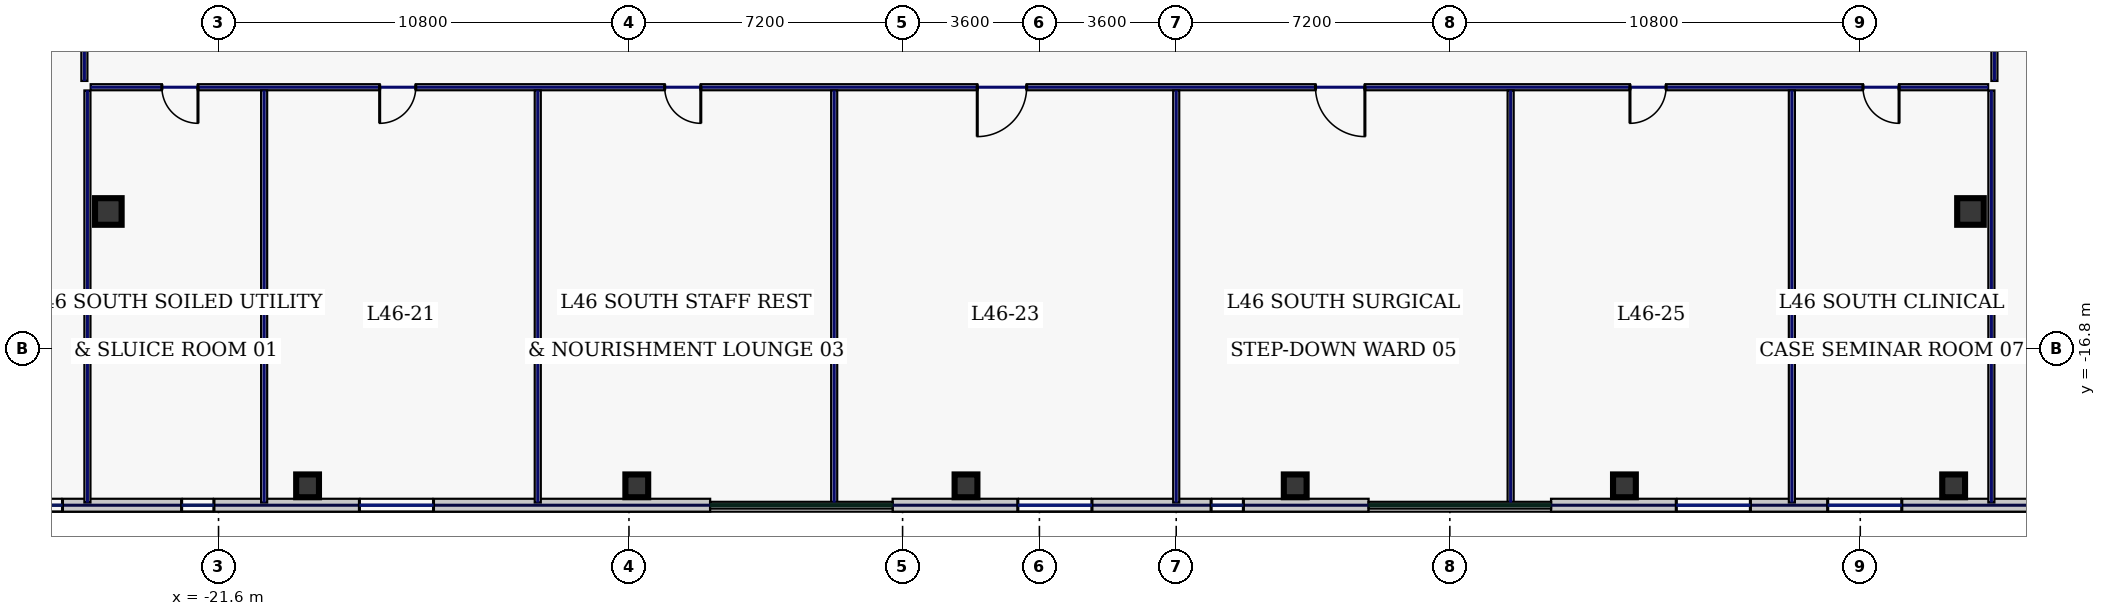
"""IFC4 building model, lengths in metres.
Left out: names, types, materials, properties, quantities, classifications, styles, units other than length and angle.
Written with IfcOpenShell. Run it as: python <this file> out.ifc"""

import sys

from ifc_helpers import new_model, si_unit, direction, frame, frame_2d, origin, origin_2d, place, context, subcontext, project, spatial, rectangle, hollow_rectangle, extrude, element, fill, save


model = new_model("IFC4")
c1 = context("Model", 3, precision=1e-05, world=origin(), true_north=direction((0.0, 1.0)))
c2 = subcontext(c1, "Body", "Model", "MODEL_VIEW")
j1 = project(units=[si_unit("LENGTHUNIT", "METRE"), si_unit("PLANEANGLEUNIT", "RADIAN")], contexts=[c1])
p1 = place(None, origin())
s1 = spatial("IfcSite", under=j1, at=p1, CompositionType="ELEMENT")
p2 = place(p1, origin())
s2 = spatial("IfcBuilding", under=s1, at=p2, CompositionType="ELEMENT")
p3 = place(p2, frame((0.0, 0.0, 200.2)))
s3 = spatial("IfcBuildingStorey", under=s2, at=p3, CompositionType="ELEMENT", Elevation=200.2)
for number, where, z_axis, x_axis in (
    (1, (-24.5, -13.2, 0.0), (0.0, 0.0, 1.0), (1.0, 0.0, 0.0)),
    (2, (24.5, -13.2, 0.0), (0.0, 0.0, 1.0), (1.0, 0.0, 0.0)),
):
    element("IfcColumn", number, at=place(p3, frame(where, z_axis=z_axis, x_axis=x_axis)), inside=s3, PredefinedType="COLUMN", context=c2, shape_type="SweptSolid", body=[
        extrude(hollow_rectangle(XDim=0.7, YDim=0.7, WallThickness=0.032, at=origin_2d()), origin(), (0.0, 0.0, 1.0), 3.74),
    ])
for number, where, z_axis, x_axis in (
    (3, (-19.257, -20.42, 0.0), (0.0, 0.0, 1.0), (1.0, 0.0, 0.0)),
    (4, (-10.594, -20.42, 0.0), (0.0, 0.0, 1.0), (1.0, 0.0, 0.0)),
    (5, (-1.931, -20.42, 0.0), (0.0, 0.0, 1.0), (1.0, 0.0, 0.0)),
    (6, (6.731, -20.42, 0.0), (0.0, 0.0, 1.0), (1.0, 0.0, 0.0)),
    (7, (15.394, -20.42, 0.0), (0.0, 0.0, 1.0), (1.0, 0.0, 0.0)),
    (8, (24.057, -20.42, 0.0), (0.0, 0.0, 1.0), (1.0, 0.0, 0.0)),
):
    element("IfcColumn", number, at=place(p3, frame(where, z_axis=z_axis, x_axis=x_axis)), inside=s3, PredefinedType="COLUMN", context=c2, shape_type="SweptSolid", body=[
        extrude(hollow_rectangle(XDim=0.6, YDim=0.6, WallThickness=0.028, at=origin_2d()), origin(), (0.0, 0.0, 1.0), 3.74),
    ])
p4 = place(p3, frame((-28.6, -20.93, 0.0), z_axis=(0.0, 0.0, 1.0), x_axis=(1.0, 0.0, 0.0)))
e9 = element("IfcWall", 9, at=p4, inside=s3, PredefinedType="STANDARD", context=c2, shape_type="SweptSolid", body=[
    extrude(rectangle(XDim=19.937, YDim=0.34, at=frame_2d((9.969, 0.0))), origin(), (0.0, 0.0, 1.0), 3.74),
])
p5 = place(p4, frame((2.044, 0.0, 0.8)))
e10 = element("IfcOpeningElement", 10, at=p5, cuts=e9, PredefinedType="OPENING", context=c2, shape_type="SweptSolid", body=[
    extrude(rectangle(XDim=0.85, YDim=1.85, at=frame_2d((0.425, 0.925))), frame((0.0, 0.18, 0.0), z_axis=(0.0, -1.0, 0.0), x_axis=(1.0, 0.0, 0.0)), (0.0, 0.0, 1.0), 0.36),
])
p6 = place(p4, frame((6.029, 0.0, 0.8)))
e11 = element("IfcOpeningElement", 11, at=p6, cuts=e9, PredefinedType="OPENING", context=c2, shape_type="SweptSolid", body=[
    extrude(rectangle(XDim=0.85, YDim=1.85, at=frame_2d((0.425, 0.925))), frame((0.0, 0.18, 0.0), z_axis=(0.0, -1.0, 0.0), x_axis=(1.0, 0.0, 0.0)), (0.0, 0.0, 1.0), 0.36),
])
p7 = place(p4, frame((10.707, 0.0, 0.8)))
e12 = element("IfcOpeningElement", 12, at=p7, cuts=e9, PredefinedType="OPENING", context=c2, shape_type="SweptSolid", body=[
    extrude(rectangle(XDim=1.95, YDim=2.1, at=frame_2d((0.975, 1.05))), frame((0.0, 0.18, 0.0), z_axis=(0.0, -1.0, 0.0), x_axis=(1.0, 0.0, 0.0)), (0.0, 0.0, 1.0), 0.36),
])
p8 = place(p3, frame((-3.863, -20.93, 0.0), z_axis=(0.0, 0.0, 1.0), x_axis=(1.0, 0.0, 0.0)))
e13 = element("IfcWall", 13, at=p8, inside=s3, PredefinedType="STANDARD", context=c2, shape_type="SweptSolid", body=[
    extrude(rectangle(XDim=12.526, YDim=0.34, at=frame_2d((6.263, 0.0))), origin(), (0.0, 0.0, 1.0), 3.74),
])
p9 = place(p8, frame((3.295, 0.0, 0.8)))
e14 = element("IfcOpeningElement", 14, at=p9, cuts=e13, PredefinedType="OPENING", context=c2, shape_type="SweptSolid", body=[
    extrude(rectangle(XDim=1.95, YDim=2.1, at=frame_2d((0.975, 1.05))), frame((0.0, 0.18, 0.0), z_axis=(0.0, -1.0, 0.0), x_axis=(1.0, 0.0, 0.0)), (0.0, 0.0, 1.0), 0.36),
])
p10 = place(p8, frame((8.38, 0.0, 0.8)))
e15 = element("IfcOpeningElement", 15, at=p10, cuts=e13, PredefinedType="OPENING", context=c2, shape_type="SweptSolid", body=[
    extrude(rectangle(XDim=0.85, YDim=1.85, at=frame_2d((0.425, 0.925))), frame((0.0, 0.18, 0.0), z_axis=(0.0, -1.0, 0.0), x_axis=(1.0, 0.0, 0.0)), (0.0, 0.0, 1.0), 0.36),
])
p11 = place(p3, frame((13.463, -20.93, 0.0), z_axis=(0.0, 0.0, 1.0), x_axis=(1.0, 0.0, 0.0)))
e16 = element("IfcWall", 16, at=p11, inside=s3, PredefinedType="STANDARD", context=c2, shape_type="SweptSolid", body=[
    extrude(rectangle(XDim=19.937, YDim=0.34, at=frame_2d((9.969, 0.0))), origin(), (0.0, 0.0, 1.0), 3.74),
])
p12 = place(p11, frame((3.295, 0.0, 0.8)))
e17 = element("IfcOpeningElement", 17, at=p12, cuts=e16, PredefinedType="OPENING", context=c2, shape_type="SweptSolid", body=[
    extrude(rectangle(XDim=1.95, YDim=2.1, at=frame_2d((0.975, 1.05))), frame((0.0, 0.18, 0.0), z_axis=(0.0, -1.0, 0.0), x_axis=(1.0, 0.0, 0.0)), (0.0, 0.0, 1.0), 0.36),
])
p13 = place(p11, frame((7.28, 0.0, 0.8)))
e18 = element("IfcOpeningElement", 18, at=p13, cuts=e16, PredefinedType="OPENING", context=c2, shape_type="SweptSolid", body=[
    extrude(rectangle(XDim=1.95, YDim=2.1, at=frame_2d((0.975, 1.05))), frame((0.0, 0.18, 0.0), z_axis=(0.0, -1.0, 0.0), x_axis=(1.0, 0.0, 0.0)), (0.0, 0.0, 1.0), 0.36),
])
p14 = place(p11, frame((13.058, 0.0, 0.8)))
e19 = element("IfcOpeningElement", 19, at=p14, cuts=e16, PredefinedType="OPENING", context=c2, shape_type="SweptSolid", body=[
    extrude(rectangle(XDim=0.85, YDim=1.85, at=frame_2d((0.425, 0.925))), frame((0.0, 0.18, 0.0), z_axis=(0.0, -1.0, 0.0), x_axis=(1.0, 0.0, 0.0)), (0.0, 0.0, 1.0), 0.36),
])
p15 = place(p11, frame((15.943, 0.0, 0.8)))
e20 = element("IfcOpeningElement", 20, at=p15, cuts=e16, PredefinedType="OPENING", context=c2, shape_type="SweptSolid", body=[
    extrude(rectangle(XDim=1.95, YDim=2.1, at=frame_2d((0.975, 1.05))), frame((0.0, 0.18, 0.0), z_axis=(0.0, -1.0, 0.0), x_axis=(1.0, 0.0, 0.0)), (0.0, 0.0, 1.0), 0.36),
])
p16 = place(p3, frame((-25.13, -9.765, 0.0), z_axis=(0.0, 0.0, 1.0), x_axis=(0.0, 1.0, 0.0)))
e21 = element("IfcWall", 21, at=p16, inside=s3, PredefinedType="PARTITIONING", context=c2, shape_type="SweptSolid", body=[
    extrude(rectangle(XDim=2.98, YDim=0.16, at=frame_2d((1.49, 0.0))), origin(), (0.0, 0.0, 1.0), 3.74),
])
p17 = place(p16, frame((1.1, 0.0, 0.0)))
e22 = element("IfcOpeningElement", 22, at=p17, cuts=e21, PredefinedType="OPENING", context=c2, shape_type="SweptSolid", body=[
    extrude(rectangle(XDim=0.95, YDim=2.2, at=frame_2d((0.475, 1.1))), frame((0.0, 0.09, 0.0), z_axis=(0.0, -1.0, 0.0), x_axis=(1.0, 0.0, 0.0)), (0.0, 0.0, 1.0), 0.18),
])
p18 = place(p3, frame((25.13, -6.785, 0.0), z_axis=(0.0, 0.0, 1.0), x_axis=(0.0, -1.0, 0.0)))
e23 = element("IfcWall", 23, at=p18, inside=s3, PredefinedType="PARTITIONING", context=c2, shape_type="SweptSolid", body=[
    extrude(rectangle(XDim=2.98, YDim=0.16, at=frame_2d((1.49, 0.0))), origin(), (0.0, 0.0, 1.0), 3.74),
])
p19 = place(p18, frame((1.1, 0.0, 0.0)))
e24 = element("IfcOpeningElement", 24, at=p19, cuts=e23, PredefinedType="OPENING", context=c2, shape_type="SweptSolid", body=[
    extrude(rectangle(XDim=0.95, YDim=2.2, at=frame_2d((0.475, 1.1))), frame((0.0, 0.09, 0.0), z_axis=(0.0, -1.0, 0.0), x_axis=(1.0, 0.0, 0.0)), (0.0, 0.0, 1.0), 0.18),
])
p20 = place(p3, frame((24.965, -9.93, 0.0), z_axis=(0.0, 0.0, 1.0), x_axis=(-1.0, 0.0, 0.0)))
e25 = element("IfcWall", 25, at=p20, inside=s3, PredefinedType="PARTITIONING", context=c2, shape_type="SweptSolid", body=[
    extrude(rectangle(XDim=49.93, YDim=0.16, at=frame_2d((24.965, 0.0))), origin(), (0.0, 0.0, 1.0), 3.74),
])
p21 = place(p20, frame((47.106, 0.0, 0.0)))
e26 = element("IfcOpeningElement", 26, at=p21, cuts=e25, PredefinedType="OPENING", context=c2, shape_type="SweptSolid", body=[
    extrude(rectangle(XDim=0.95, YDim=2.2, at=frame_2d((0.475, 1.1))), frame((0.0, 0.09, 0.0), z_axis=(0.0, -1.0, 0.0), x_axis=(1.0, 0.0, 0.0)), (0.0, 0.0, 1.0), 0.18),
])
p22 = place(p20, frame((41.375, 0.0, 0.0)))
e27 = element("IfcOpeningElement", 27, at=p22, cuts=e25, PredefinedType="OPENING", context=c2, shape_type="SweptSolid", body=[
    extrude(rectangle(XDim=0.95, YDim=2.2, at=frame_2d((0.475, 1.1))), frame((0.0, 0.09, 0.0), z_axis=(0.0, -1.0, 0.0), x_axis=(1.0, 0.0, 0.0)), (0.0, 0.0, 1.0), 0.18),
])
p23 = place(p20, frame((33.875, 0.0, 0.0)))
e28 = element("IfcOpeningElement", 28, at=p23, cuts=e25, PredefinedType="OPENING", context=c2, shape_type="SweptSolid", body=[
    extrude(rectangle(XDim=0.95, YDim=2.2, at=frame_2d((0.475, 1.1))), frame((0.0, 0.09, 0.0), z_axis=(0.0, -1.0, 0.0), x_axis=(1.0, 0.0, 0.0)), (0.0, 0.0, 1.0), 0.18),
])
p24 = place(p20, frame((25.3, 0.0, 0.0)))
e29 = element("IfcOpeningElement", 29, at=p24, cuts=e25, PredefinedType="OPENING", context=c2, shape_type="SweptSolid", body=[
    extrude(rectangle(XDim=1.3, YDim=2.2, at=frame_2d((0.65, 1.1))), frame((0.0, 0.09, 0.0), z_axis=(0.0, -1.0, 0.0), x_axis=(1.0, 0.0, 0.0)), (0.0, 0.0, 1.0), 0.18),
])
p25 = place(p20, frame((16.4, 0.0, 0.0)))
e30 = element("IfcOpeningElement", 30, at=p25, cuts=e25, PredefinedType="OPENING", context=c2, shape_type="SweptSolid", body=[
    extrude(rectangle(XDim=1.3, YDim=2.2, at=frame_2d((0.65, 1.1))), frame((0.0, 0.09, 0.0), z_axis=(0.0, -1.0, 0.0), x_axis=(1.0, 0.0, 0.0)), (0.0, 0.0, 1.0), 0.18),
])
p26 = place(p20, frame((8.475, 0.0, 0.0)))
e31 = element("IfcOpeningElement", 31, at=p26, cuts=e25, PredefinedType="OPENING", context=c2, shape_type="SweptSolid", body=[
    extrude(rectangle(XDim=0.95, YDim=2.2, at=frame_2d((0.475, 1.1))), frame((0.0, 0.09, 0.0), z_axis=(0.0, -1.0, 0.0), x_axis=(1.0, 0.0, 0.0)), (0.0, 0.0, 1.0), 0.18),
])
p27 = place(p20, frame((2.344, 0.0, 0.0)))
e32 = element("IfcOpeningElement", 32, at=p27, cuts=e25, PredefinedType="OPENING", context=c2, shape_type="SweptSolid", body=[
    extrude(rectangle(XDim=0.95, YDim=2.2, at=frame_2d((0.475, 1.1))), frame((0.0, 0.09, 0.0), z_axis=(0.0, -1.0, 0.0), x_axis=(1.0, 0.0, 0.0)), (0.0, 0.0, 1.0), 0.18),
])
for number, where, z_axis, x_axis in (
    (33, (-25.05, -20.86, 0.0), (0.0, 0.0, 1.0), (0.0, 1.0, 0.0)),
    (34, (25.05, -20.86, 0.0), (0.0, 0.0, 1.0), (0.0, 1.0, 0.0)),
    (35, (-20.4, -20.86, 0.0), (0.0, 0.0, 1.0), (0.0, 1.0, 0.0)),
    (36, (-13.2, -20.86, 0.0), (0.0, 0.0, 1.0), (0.0, 1.0, 0.0)),
    (37, (-5.4, -20.86, 0.0), (0.0, 0.0, 1.0), (0.0, 1.0, 0.0)),
    (38, (3.6, -20.86, 0.0), (0.0, 0.0, 1.0), (0.0, 1.0, 0.0)),
    (39, (12.4, -20.86, 0.0), (0.0, 0.0, 1.0), (0.0, 1.0, 0.0)),
    (40, (19.8, -20.86, 0.0), (0.0, 0.0, 1.0), (0.0, 1.0, 0.0)),
):
    element("IfcWall", number, at=place(p3, frame(where, z_axis=z_axis, x_axis=x_axis)), inside=s3, PredefinedType="PARTITIONING", context=c2, shape_type="SweptSolid", body=[
        extrude(rectangle(XDim=10.845, YDim=0.16, at=frame_2d((5.423, 0.0))), origin(), (0.0, 0.0, 1.0), 3.74),
    ])
p28 = place(p5, origin())
e41 = element("IfcWindow", 41, at=p28, inside=s3, PartitioningType="SINGLE_PANEL", PredefinedType="WINDOW", context=c2, shape_type="SweptSolid", body=[
    extrude(rectangle(XDim=0.85, YDim=1.85, at=frame_2d((0.425, 0.925))), frame((0.0, 0.03, 0.0), z_axis=(0.0, -1.0, 0.0), x_axis=(1.0, 0.0, 0.0)), (0.0, 0.0, 1.0), 0.06),
])
fill(e10, e41)
p29 = place(p6, origin())
e42 = element("IfcWindow", 42, at=p29, inside=s3, PartitioningType="SINGLE_PANEL", PredefinedType="WINDOW", context=c2, shape_type="SweptSolid", body=[
    extrude(rectangle(XDim=0.85, YDim=1.85, at=frame_2d((0.425, 0.925))), frame((0.0, 0.03, 0.0), z_axis=(0.0, -1.0, 0.0), x_axis=(1.0, 0.0, 0.0)), (0.0, 0.0, 1.0), 0.06),
])
fill(e11, e42)
p30 = place(p7, origin())
e43 = element("IfcWindow", 43, at=p30, inside=s3, PartitioningType="SINGLE_PANEL", PredefinedType="WINDOW", context=c2, shape_type="SweptSolid", body=[
    extrude(rectangle(XDim=1.95, YDim=2.1, at=frame_2d((0.975, 1.05))), frame((0.0, 0.03, 0.0), z_axis=(0.0, -1.0, 0.0), x_axis=(1.0, 0.0, 0.0)), (0.0, 0.0, 1.0), 0.06),
])
fill(e12, e43)
p31 = place(p9, origin())
e44 = element("IfcWindow", 44, at=p31, inside=s3, PartitioningType="SINGLE_PANEL", PredefinedType="WINDOW", context=c2, shape_type="SweptSolid", body=[
    extrude(rectangle(XDim=1.95, YDim=2.1, at=frame_2d((0.975, 1.05))), frame((0.0, 0.03, 0.0), z_axis=(0.0, -1.0, 0.0), x_axis=(1.0, 0.0, 0.0)), (0.0, 0.0, 1.0), 0.06),
])
fill(e14, e44)
p32 = place(p10, origin())
e45 = element("IfcWindow", 45, at=p32, inside=s3, PartitioningType="SINGLE_PANEL", PredefinedType="WINDOW", context=c2, shape_type="SweptSolid", body=[
    extrude(rectangle(XDim=0.85, YDim=1.85, at=frame_2d((0.425, 0.925))), frame((0.0, 0.03, 0.0), z_axis=(0.0, -1.0, 0.0), x_axis=(1.0, 0.0, 0.0)), (0.0, 0.0, 1.0), 0.06),
])
fill(e15, e45)
p33 = place(p12, origin())
e46 = element("IfcWindow", 46, at=p33, inside=s3, PartitioningType="SINGLE_PANEL", PredefinedType="WINDOW", context=c2, shape_type="SweptSolid", body=[
    extrude(rectangle(XDim=1.95, YDim=2.1, at=frame_2d((0.975, 1.05))), frame((0.0, 0.03, 0.0), z_axis=(0.0, -1.0, 0.0), x_axis=(1.0, 0.0, 0.0)), (0.0, 0.0, 1.0), 0.06),
])
fill(e17, e46)
p34 = place(p13, origin())
e47 = element("IfcWindow", 47, at=p34, inside=s3, PartitioningType="SINGLE_PANEL", PredefinedType="WINDOW", context=c2, shape_type="SweptSolid", body=[
    extrude(rectangle(XDim=1.95, YDim=2.1, at=frame_2d((0.975, 1.05))), frame((0.0, 0.03, 0.0), z_axis=(0.0, -1.0, 0.0), x_axis=(1.0, 0.0, 0.0)), (0.0, 0.0, 1.0), 0.06),
])
fill(e18, e47)
p35 = place(p21, origin())
e48 = element("IfcDoor", 48, at=p35, inside=s3, OperationType="SINGLE_SWING_LEFT", PredefinedType="DOOR", context=c2, shape_type="SweptSolid", body=[
    extrude(rectangle(XDim=0.95, YDim=2.2, at=frame_2d((0.475, 1.1))), frame((0.0, 0.025, 0.0), z_axis=(0.0, -1.0, 0.0), x_axis=(1.0, 0.0, 0.0)), (0.0, 0.0, 1.0), 0.05),
])
fill(e26, e48)
p36 = place(p22, origin())
e49 = element("IfcDoor", 49, at=p36, inside=s3, OperationType="SINGLE_SWING_RIGHT", PredefinedType="DOOR", context=c2, shape_type="SweptSolid", body=[
    extrude(rectangle(XDim=0.95, YDim=2.2, at=frame_2d((0.475, 1.1))), frame((0.0, 0.025, 0.0), z_axis=(0.0, -1.0, 0.0), x_axis=(1.0, 0.0, 0.0)), (0.0, 0.0, 1.0), 0.05),
])
fill(e27, e49)
p37 = place(p23, origin())
e50 = element("IfcDoor", 50, at=p37, inside=s3, OperationType="SINGLE_SWING_LEFT", PredefinedType="DOOR", context=c2, shape_type="SweptSolid", body=[
    extrude(rectangle(XDim=0.95, YDim=2.2, at=frame_2d((0.475, 1.1))), frame((0.0, 0.025, 0.0), z_axis=(0.0, -1.0, 0.0), x_axis=(1.0, 0.0, 0.0)), (0.0, 0.0, 1.0), 0.05),
])
fill(e28, e50)
p38 = place(p24, origin())
e51 = element("IfcDoor", 51, at=p38, inside=s3, OperationType="SINGLE_SWING_RIGHT", PredefinedType="DOOR", context=c2, shape_type="SweptSolid", body=[
    extrude(rectangle(XDim=1.3, YDim=2.2, at=frame_2d((0.65, 1.1))), frame((0.0, 0.025, 0.0), z_axis=(0.0, -1.0, 0.0), x_axis=(1.0, 0.0, 0.0)), (0.0, 0.0, 1.0), 0.05),
])
fill(e29, e51)
p39 = place(p25, origin())
e52 = element("IfcDoor", 52, at=p39, inside=s3, OperationType="SINGLE_SWING_LEFT", PredefinedType="DOOR", context=c2, shape_type="SweptSolid", body=[
    extrude(rectangle(XDim=1.3, YDim=2.2, at=frame_2d((0.65, 1.1))), frame((0.0, 0.025, 0.0), z_axis=(0.0, -1.0, 0.0), x_axis=(1.0, 0.0, 0.0)), (0.0, 0.0, 1.0), 0.05),
])
fill(e30, e52)
p40 = place(p26, origin())
e53 = element("IfcDoor", 53, at=p40, inside=s3, OperationType="SINGLE_SWING_RIGHT", PredefinedType="DOOR", context=c2, shape_type="SweptSolid", body=[
    extrude(rectangle(XDim=0.95, YDim=2.2, at=frame_2d((0.475, 1.1))), frame((0.0, 0.025, 0.0), z_axis=(0.0, -1.0, 0.0), x_axis=(1.0, 0.0, 0.0)), (0.0, 0.0, 1.0), 0.05),
])
fill(e31, e53)
p41 = place(p27, origin())
e54 = element("IfcDoor", 54, at=p41, inside=s3, OperationType="SINGLE_SWING_LEFT", PredefinedType="DOOR", context=c2, shape_type="SweptSolid", body=[
    extrude(rectangle(XDim=0.95, YDim=2.2, at=frame_2d((0.475, 1.1))), frame((0.0, 0.025, 0.0), z_axis=(0.0, -1.0, 0.0), x_axis=(1.0, 0.0, 0.0)), (0.0, 0.0, 1.0), 0.05),
])
fill(e32, e54)
save(model, sys.argv[1])
